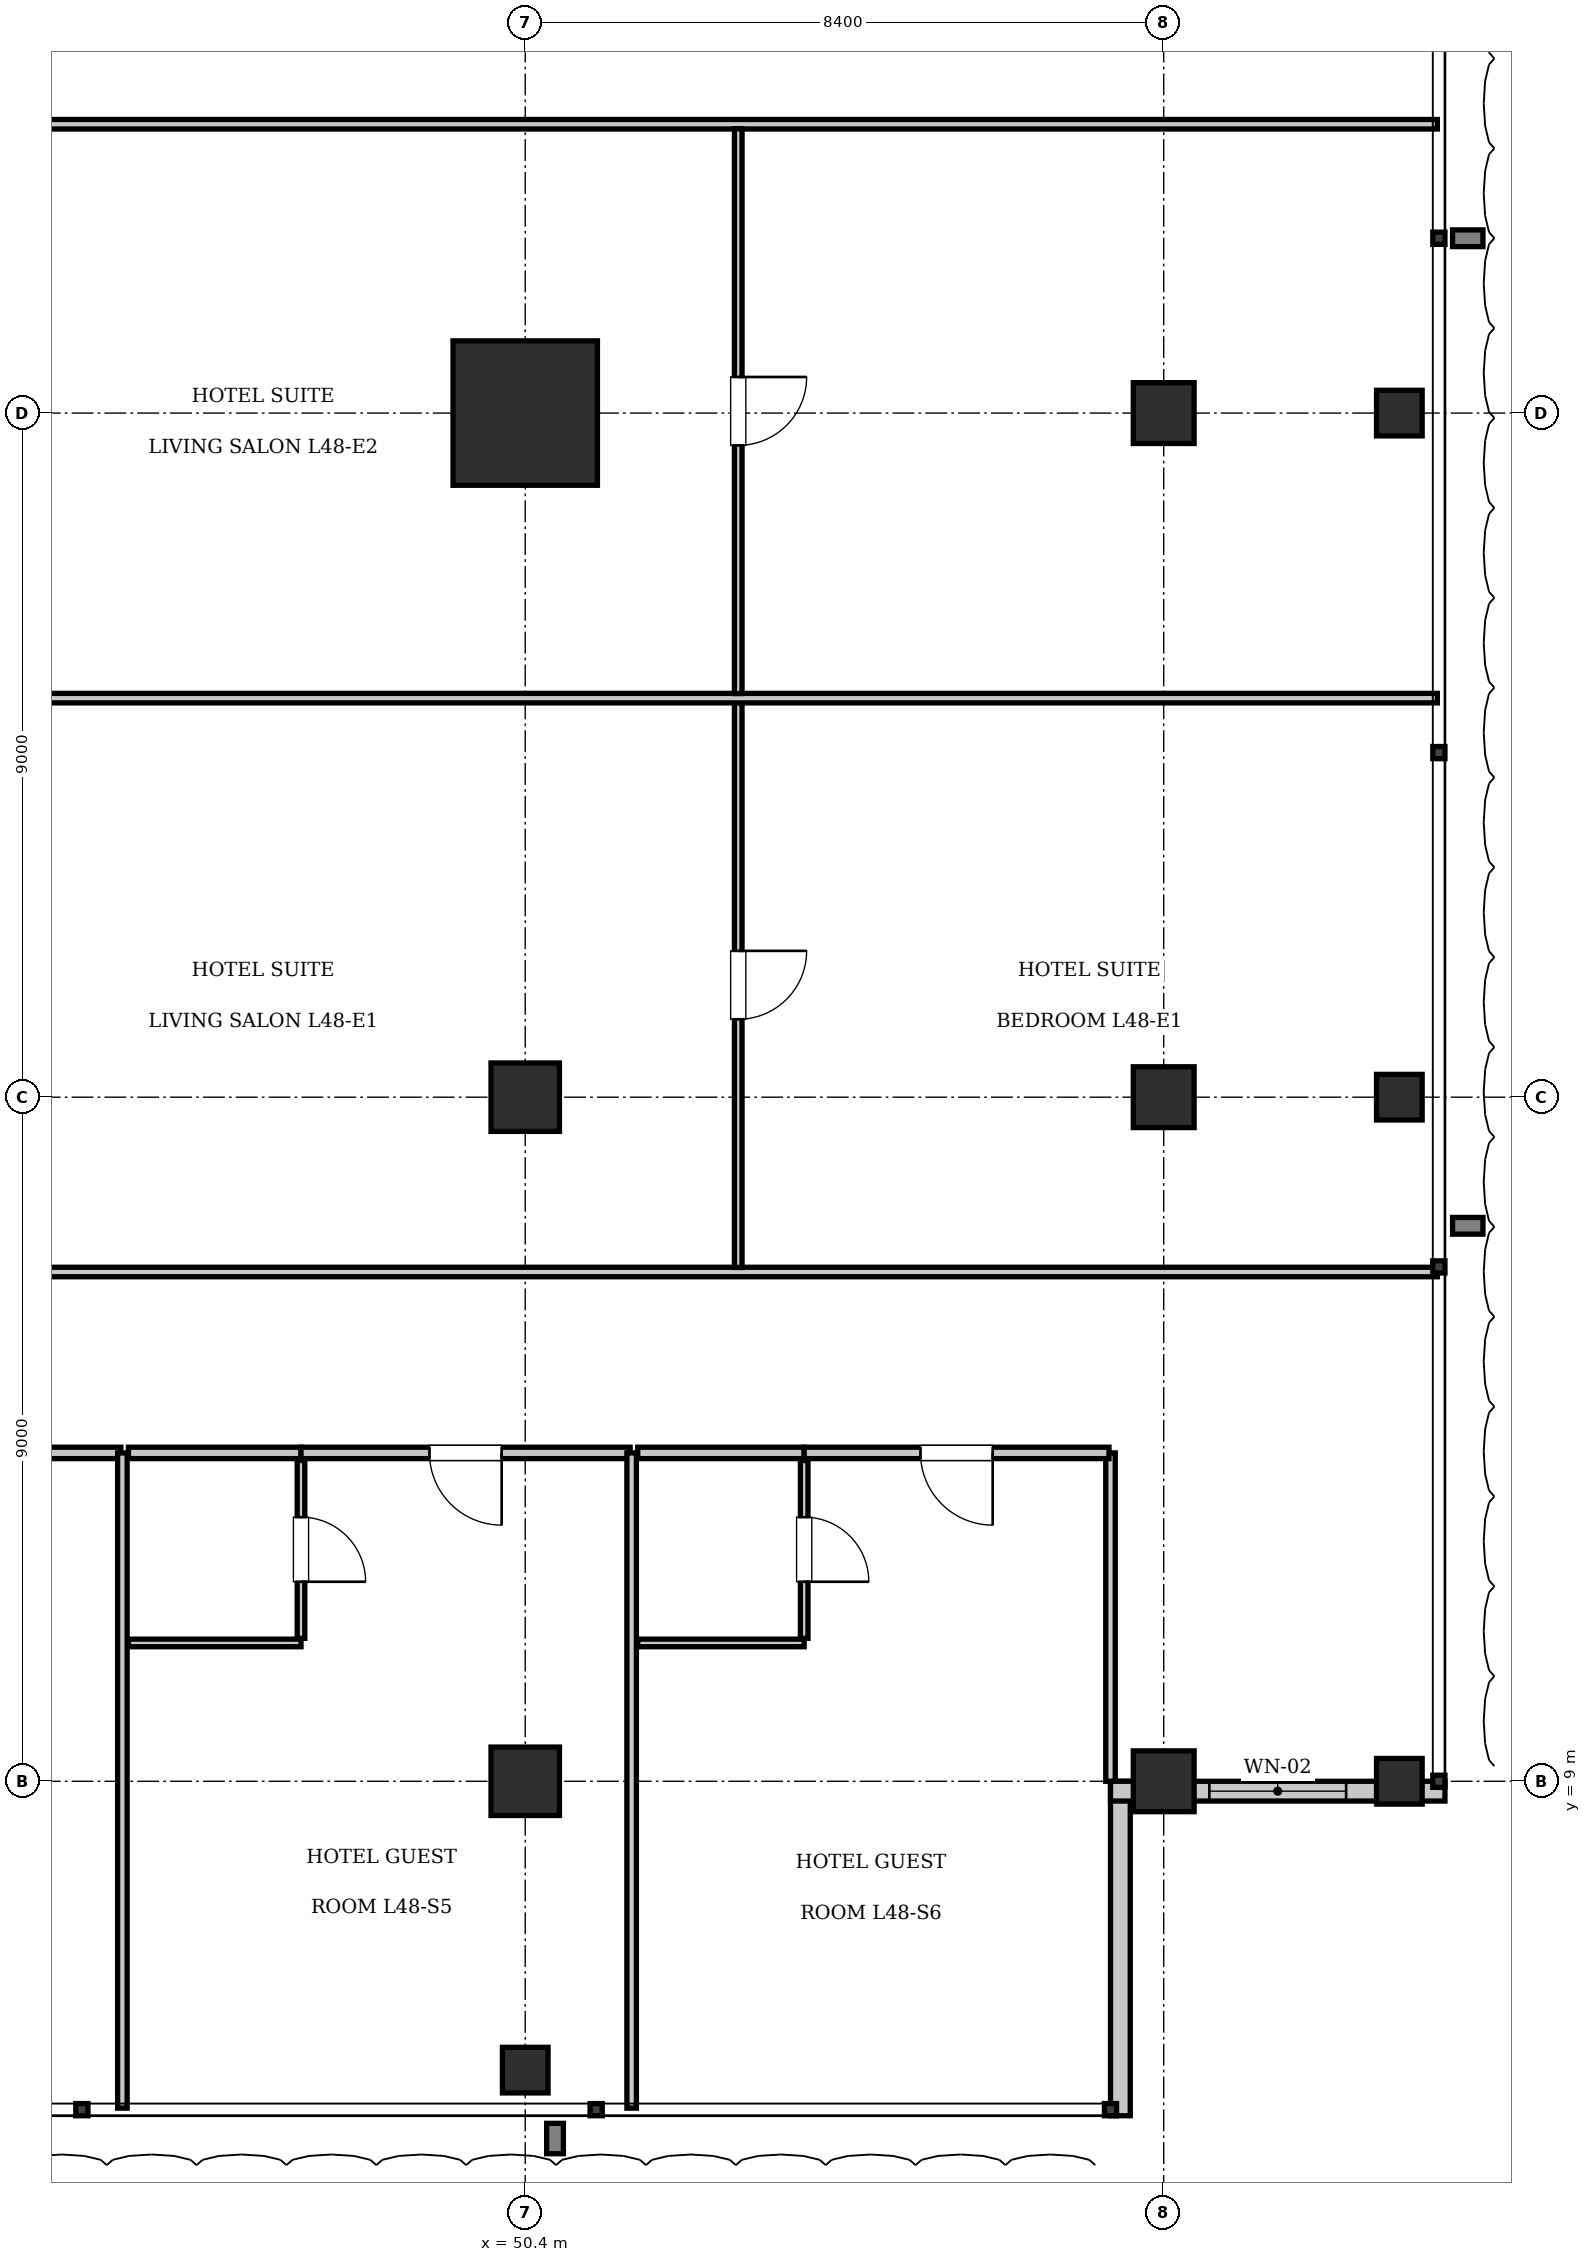
"""IFC4 building model, lengths in metres.
Left out: names, types, materials, properties, quantities, classifications, styles, units other than length and angle.
Written with IfcOpenShell. Run it as: python <this file> out.ifc"""

import sys

from ifc_helpers import new_model, si_unit, direction, frame, frame_2d, origin, origin_2d, place, context, subcontext, project, spatial, rectangle, i_section, extrude, element, fill, save


model = new_model("IFC4")
c1 = context("Model", 3, precision=1e-05, world=origin(), true_north=direction((0.0, 1.0)))
c2 = subcontext(c1, "Body", "Model", "MODEL_VIEW")
j1 = project(units=[si_unit("LENGTHUNIT", "METRE"), si_unit("PLANEANGLEUNIT", "RADIAN")], contexts=[c1])
p1 = place(None, origin())
s1 = spatial("IfcSite", under=j1, at=p1, CompositionType="ELEMENT")
p2 = place(p1, origin())
s2 = spatial("IfcBuilding", under=s1, at=p2, CompositionType="ELEMENT")
p3 = place(p2, frame((0.0, 0.0, 196.7)))
s3 = spatial("IfcBuildingStorey", under=s2, at=p3, CompositionType="ELEMENT", Elevation=196.7)
p4 = place(p3, frame((50.4, 27.0, 0.0), z_axis=(0.0, 0.0, 1.0), x_axis=(1.0, 0.0, 0.0)))
e1 = element("IfcColumn", 1, at=p4, inside=s3, PredefinedType="COLUMN", context=c2, shape_type="SweptSolid", body=[
    extrude(rectangle(XDim=1.9, YDim=1.9, at=origin_2d()), origin(), (0.0, 0.0, 1.0), 3.85),
])
for number, where, z_axis, x_axis in (
    (2, (50.4, 18.0, 0.0), (0.0, 0.0, 1.0), (1.0, 0.0, 0.0)),
    (3, (50.4, 9.0, 0.0), (0.0, 0.0, 1.0), (1.0, 0.0, 0.0)),
):
    element("IfcColumn", number, at=place(p3, frame(where, z_axis=z_axis, x_axis=x_axis)), inside=s3, PredefinedType="COLUMN", context=c2, shape_type="SweptSolid", body=[
        extrude(rectangle(XDim=0.9, YDim=0.9, at=origin_2d()), origin(), (0.0, 0.0, 1.0), 3.85),
    ])
for number, where, z_axis, x_axis in (
    (4, (58.8, 9.0, 0.0), (0.0, 0.0, 1.0), (1.0, 0.0, 0.0)),
    (5, (58.8, 18.0, 0.0), (0.0, 0.0, 1.0), (1.0, 0.0, 0.0)),
    (6, (58.8, 27.0, 0.0), (0.0, 0.0, 1.0), (1.0, 0.0, 0.0)),
):
    element("IfcColumn", number, at=place(p3, frame(where, z_axis=z_axis, x_axis=x_axis)), inside=s3, PredefinedType="COLUMN", context=c2, shape_type="SweptSolid", body=[
        extrude(rectangle(XDim=0.8, YDim=0.8, at=origin_2d()), origin(), (0.0, 0.0, 1.0), 3.85),
    ])
for number, where, z_axis, x_axis in (
    (7, (61.9, 9.0, 0.0), (0.0, 0.0, 1.0), (1.0, 0.0, 0.0)),
    (8, (61.9, 18.0, 0.0), (0.0, 0.0, 1.0), (1.0, 0.0, 0.0)),
    (9, (61.9, 27.0, 0.0), (0.0, 0.0, 1.0), (1.0, 0.0, 0.0)),
    (10, (50.4, 5.2, 0.0), (0.0, 0.0, 1.0), (1.0, 0.0, 0.0)),
):
    element("IfcColumn", number, at=place(p3, frame(where, z_axis=z_axis, x_axis=x_axis)), inside=s3, PredefinedType="COLUMN", context=c2, shape_type="SweptSolid", body=[
        extrude(i_section(OverallWidth=0.6, OverallDepth=0.6, WebThickness=0.025, FlangeThickness=0.038, at=origin_2d()), origin(), (0.0, 0.0, 1.0), 3.85),
    ])
p5 = place(p3, frame((58.23, 9.0, 0.0), z_axis=(0.0, 0.0, 1.0), x_axis=(0.0, -1.0, 0.0)))
e11 = element("IfcWall", 11, at=p5, inside=s3, PredefinedType="SOLIDWALL", context=c2, shape_type="SweptSolid", body=[
    extrude(rectangle(XDim=4.4, YDim=0.26, at=frame_2d((2.2, 0.0))), origin(), (0.0, 0.0, 1.0), 3.61),
])
p6 = place(p3, frame((62.5, 8.87, 0.0), z_axis=(0.0, 0.0, 1.0), x_axis=(-1.0, 0.0, 0.0)))
e12 = element("IfcWall", 12, at=p6, inside=s3, PredefinedType="SOLIDWALL", context=c2, shape_type="SweptSolid", body=[
    extrude(rectangle(XDim=4.4, YDim=0.26, at=frame_2d((2.2, 0.0))), origin(), (0.0, 0.0, 1.0), 3.071),
])
p7 = place(p6, frame((1.3, 0.0, 0.9)))
e13 = element("IfcOpeningElement", 13, at=p7, cuts=e12, PredefinedType="OPENING", context=c2, shape_type="SweptSolid", body=[
    extrude(rectangle(XDim=1.8, YDim=2.1, at=frame_2d((0.9, 1.05))), frame((0.0, 0.14, 0.0), z_axis=(0.0, -1.0, 0.0), x_axis=(1.0, 0.0, 0.0)), (0.0, 0.0, 1.0), 0.28),
])
p8 = place(p3, frame((58.1, 9.0, 0.0), z_axis=(0.0, 0.0, 1.0), x_axis=(0.0, 1.0, 0.0)))
e14 = element("IfcWall", 14, at=p8, inside=s3, PredefinedType="PARTITIONING", context=c2, shape_type="SweptSolid", body=[
    extrude(rectangle(XDim=4.32, YDim=0.125, at=frame_2d((2.16, 0.0))), origin(), (0.0, 0.0, 1.0), 3.61),
])
p9 = place(p3, frame((40.15, 13.32, 0.0), z_axis=(0.0, 0.0, 1.0), x_axis=(1.0, 0.0, 0.0)))
e15 = element("IfcWall", 15, at=p9, inside=s3, PredefinedType="PARTITIONING", context=c2, shape_type="SweptSolid", body=[
    extrude(rectangle(XDim=4.93, YDim=0.15, at=frame_2d((2.465, 0.0))), origin(), (0.0, 0.0, 1.0), 3.61),
])
p10 = place(p9, frame((1.99, 0.0, 0.0)))
e16 = element("IfcOpeningElement", 16, at=p10, cuts=e15, PredefinedType="OPENING", context=c2, shape_type="SweptSolid", body=[
    extrude(rectangle(XDim=0.95, YDim=2.15, at=frame_2d((0.475, 1.075))), frame((0.0, 0.085, 0.0), z_axis=(0.0, -1.0, 0.0), x_axis=(1.0, 0.0, 0.0)), (0.0, 0.0, 1.0), 0.17),
])
p11 = place(p3, frame((45.1, 4.7, 0.0), z_axis=(0.0, 0.0, 1.0), x_axis=(0.0, 1.0, 0.0)))
e17 = element("IfcWall", 17, at=p11, inside=s3, PredefinedType="PARTITIONING", context=c2, shape_type="SweptSolid", body=[
    extrude(rectangle(XDim=8.62, YDim=0.125, at=frame_2d((4.31, 0.0))), origin(), (0.0, 0.0, 1.0), 3.61),
])
p12 = place(p3, frame((45.18, 13.32, 0.0), z_axis=(0.0, 0.0, 1.0), x_axis=(1.0, 0.0, 0.0)))
e18 = element("IfcWall", 18, at=p12, inside=s3, PredefinedType="PARTITIONING", context=c2, shape_type="SweptSolid", body=[
    extrude(rectangle(XDim=2.27, YDim=0.15, at=frame_2d((1.135, 0.0))), origin(), (0.0, 0.0, 1.0), 3.61),
])
p13 = place(p3, frame((45.18, 10.82, 0.0), z_axis=(0.0, 0.0, 1.0), x_axis=(1.0, 0.0, 0.0)))
e19 = element("IfcWall", 19, at=p13, inside=s3, PredefinedType="PARTITIONING", context=c2, shape_type="SweptSolid", body=[
    extrude(rectangle(XDim=2.27, YDim=0.1, at=frame_2d((1.135, 0.0))), origin(), (0.0, 0.0, 1.0), 3.61),
])
p14 = place(p3, frame((47.45, 10.88, 0.0), z_axis=(0.0, 0.0, 1.0), x_axis=(0.0, 1.0, 0.0)))
e20 = element("IfcWall", 20, at=p14, inside=s3, PredefinedType="PARTITIONING", context=c2, shape_type="SweptSolid", body=[
    extrude(rectangle(XDim=2.34, YDim=0.1, at=frame_2d((1.17, 0.0))), origin(), (0.0, 0.0, 1.0), 3.61),
])
p15 = place(p14, frame((0.745, 0.0, 0.0)))
e21 = element("IfcOpeningElement", 21, at=p15, cuts=e20, PredefinedType="OPENING", context=c2, shape_type="SweptSolid", body=[
    extrude(rectangle(XDim=0.85, YDim=2.1, at=frame_2d((0.425, 1.05))), frame((0.0, 0.06, 0.0), z_axis=(0.0, -1.0, 0.0), x_axis=(1.0, 0.0, 0.0)), (0.0, 0.0, 1.0), 0.12),
])
p16 = place(p3, frame((47.45, 13.32, 0.0), z_axis=(0.0, 0.0, 1.0), x_axis=(1.0, 0.0, 0.0)))
e22 = element("IfcWall", 22, at=p16, inside=s3, PredefinedType="PARTITIONING", context=c2, shape_type="SweptSolid", body=[
    extrude(rectangle(XDim=4.33, YDim=0.15, at=frame_2d((2.165, 0.0))), origin(), (0.0, 0.0, 1.0), 3.61),
])
p17 = place(p16, frame((1.69, 0.0, 0.0)))
e23 = element("IfcOpeningElement", 23, at=p17, cuts=e22, PredefinedType="OPENING", context=c2, shape_type="SweptSolid", body=[
    extrude(rectangle(XDim=0.95, YDim=2.15, at=frame_2d((0.475, 1.075))), frame((0.0, 0.085, 0.0), z_axis=(0.0, -1.0, 0.0), x_axis=(1.0, 0.0, 0.0)), (0.0, 0.0, 1.0), 0.17),
])
p18 = place(p3, frame((51.8, 4.7, 0.0), z_axis=(0.0, 0.0, 1.0), x_axis=(0.0, 1.0, 0.0)))
e24 = element("IfcWall", 24, at=p18, inside=s3, PredefinedType="PARTITIONING", context=c2, shape_type="SweptSolid", body=[
    extrude(rectangle(XDim=8.62, YDim=0.125, at=frame_2d((4.31, 0.0))), origin(), (0.0, 0.0, 1.0), 3.61),
])
p19 = place(p3, frame((51.88, 13.32, 0.0), z_axis=(0.0, 0.0, 1.0), x_axis=(1.0, 0.0, 0.0)))
e25 = element("IfcWall", 25, at=p19, inside=s3, PredefinedType="PARTITIONING", context=c2, shape_type="SweptSolid", body=[
    extrude(rectangle(XDim=2.19, YDim=0.15, at=frame_2d((1.095, 0.0))), origin(), (0.0, 0.0, 1.0), 3.61),
])
p20 = place(p3, frame((51.88, 10.82, 0.0), z_axis=(0.0, 0.0, 1.0), x_axis=(1.0, 0.0, 0.0)))
e26 = element("IfcWall", 26, at=p20, inside=s3, PredefinedType="PARTITIONING", context=c2, shape_type="SweptSolid", body=[
    extrude(rectangle(XDim=2.19, YDim=0.1, at=frame_2d((1.095, 0.0))), origin(), (0.0, 0.0, 1.0), 3.61),
])
p21 = place(p3, frame((54.07, 10.88, 0.0), z_axis=(0.0, 0.0, 1.0), x_axis=(0.0, 1.0, 0.0)))
e27 = element("IfcWall", 27, at=p21, inside=s3, PredefinedType="PARTITIONING", context=c2, shape_type="SweptSolid", body=[
    extrude(rectangle(XDim=2.34, YDim=0.1, at=frame_2d((1.17, 0.0))), origin(), (0.0, 0.0, 1.0), 3.61),
])
p22 = place(p21, frame((0.745, 0.0, 0.0)))
e28 = element("IfcOpeningElement", 28, at=p22, cuts=e27, PredefinedType="OPENING", context=c2, shape_type="SweptSolid", body=[
    extrude(rectangle(XDim=0.85, YDim=2.1, at=frame_2d((0.425, 1.05))), frame((0.0, 0.06, 0.0), z_axis=(0.0, -1.0, 0.0), x_axis=(1.0, 0.0, 0.0)), (0.0, 0.0, 1.0), 0.12),
])
p23 = place(p3, frame((54.07, 13.32, 0.0), z_axis=(0.0, 0.0, 1.0), x_axis=(1.0, 0.0, 0.0)))
e29 = element("IfcWall", 29, at=p23, inside=s3, PredefinedType="PARTITIONING", context=c2, shape_type="SweptSolid", body=[
    extrude(rectangle(XDim=4.01, YDim=0.15, at=frame_2d((2.005, 0.0))), origin(), (0.0, 0.0, 1.0), 3.61),
])
p24 = place(p23, frame((1.53, 0.0, 0.0)))
e30 = element("IfcOpeningElement", 30, at=p24, cuts=e29, PredefinedType="OPENING", context=c2, shape_type="SweptSolid", body=[
    extrude(rectangle(XDim=0.95, YDim=2.15, at=frame_2d((0.475, 1.075))), frame((0.0, 0.085, 0.0), z_axis=(0.0, -1.0, 0.0), x_axis=(1.0, 0.0, 0.0)), (0.0, 0.0, 1.0), 0.17),
])
for number, where, z_axis, x_axis in (
    (31, (40.68, 15.7, 0.0), (0.0, 0.0, 1.0), (1.0, 0.0, 0.0)),
    (32, (40.68, 30.8, 0.0), (0.0, 0.0, 1.0), (1.0, 0.0, 0.0)),
):
    element("IfcWall", number, at=place(p3, frame(where, z_axis=z_axis, x_axis=x_axis)), inside=s3, PredefinedType="PARTITIONING", context=c2, shape_type="SweptSolid", body=[
        extrude(rectangle(XDim=21.72, YDim=0.125, at=frame_2d((10.86, 0.0))), origin(), (0.0, 0.0, 1.0), 3.61),
    ])
p25 = place(p3, frame((53.202, 15.76, 0.0), z_axis=(0.0, 0.0, 1.0), x_axis=(0.0, 1.0, 0.0)))
e33 = element("IfcWall", 33, at=p25, inside=s3, PredefinedType="PARTITIONING", context=c2, shape_type="SweptSolid", body=[
    extrude(rectangle(XDim=7.43, YDim=0.1, at=frame_2d((3.715, 0.0))), origin(), (0.0, 0.0, 1.0), 3.61),
])
p26 = place(p25, frame((3.265, 0.0, 0.0)))
e34 = element("IfcOpeningElement", 34, at=p26, cuts=e33, PredefinedType="OPENING", context=c2, shape_type="SweptSolid", body=[
    extrude(rectangle(XDim=0.9, YDim=2.1, at=frame_2d((0.45, 1.05))), frame((0.0, 0.06, 0.0), z_axis=(0.0, -1.0, 0.0), x_axis=(1.0, 0.0, 0.0)), (0.0, 0.0, 1.0), 0.12),
])
p27 = place(p3, frame((40.68, 23.25, 0.0), z_axis=(0.0, 0.0, 1.0), x_axis=(1.0, 0.0, 0.0)))
e35 = element("IfcWall", 35, at=p27, inside=s3, PredefinedType="PARTITIONING", context=c2, shape_type="SweptSolid", body=[
    extrude(rectangle(XDim=21.72, YDim=0.125, at=frame_2d((10.86, 0.0))), origin(), (0.0, 0.0, 1.0), 3.61),
])
p28 = place(p3, frame((53.202, 23.31, 0.0), z_axis=(0.0, 0.0, 1.0), x_axis=(0.0, 1.0, 0.0)))
e36 = element("IfcWall", 36, at=p28, inside=s3, PredefinedType="PARTITIONING", context=c2, shape_type="SweptSolid", body=[
    extrude(rectangle(XDim=7.43, YDim=0.1, at=frame_2d((3.715, 0.0))), origin(), (0.0, 0.0, 1.0), 3.61),
])
p29 = place(p28, frame((3.265, 0.0, 0.0)))
e37 = element("IfcOpeningElement", 37, at=p29, cuts=e36, PredefinedType="OPENING", context=c2, shape_type="SweptSolid", body=[
    extrude(rectangle(XDim=0.9, YDim=2.1, at=frame_2d((0.45, 1.05))), frame((0.0, 0.06, 0.0), z_axis=(0.0, -1.0, 0.0), x_axis=(1.0, 0.0, 0.0)), (0.0, 0.0, 1.0), 0.12),
])
p30 = place(p7, origin())
e38 = element("IfcWindow", 38, at=p30, inside=s3, PartitioningType="SINGLE_PANEL", PredefinedType="WINDOW", context=c2, shape_type="SweptSolid", body=[
    extrude(rectangle(XDim=1.8, YDim=2.1, at=frame_2d((0.9, 1.05))), frame((0.0, 0.03, 0.0), z_axis=(0.0, -1.0, 0.0), x_axis=(1.0, 0.0, 0.0)), (0.0, 0.0, 1.0), 0.06),
])
fill(e13, e38)
p31 = place(p15, frame((0.85, 0.0, 0.0), z_axis=(0.0, 0.0, 1.0), x_axis=(-1.0, 0.0, 0.0)))
e39 = element("IfcDoor", 39, at=p31, inside=s3, OperationType="SINGLE_SWING_RIGHT", PredefinedType="DOOR", context=c2, shape_type="SweptSolid", body=[
    extrude(rectangle(XDim=0.85, YDim=2.1, at=frame_2d((0.425, 1.05))), frame((0.0, 0.025, 0.0), z_axis=(0.0, -1.0, 0.0), x_axis=(1.0, 0.0, 0.0)), (0.0, 0.0, 1.0), 0.05),
])
fill(e21, e39)
p32 = place(p17, frame((0.95, 0.0, 0.0), z_axis=(0.0, 0.0, 1.0), x_axis=(-1.0, 0.0, 0.0)))
e40 = element("IfcDoor", 40, at=p32, inside=s3, OperationType="SINGLE_SWING_LEFT", PredefinedType="DOOR", context=c2, shape_type="SweptSolid", body=[
    extrude(rectangle(XDim=0.95, YDim=2.15, at=frame_2d((0.475, 1.075))), frame((0.0, 0.025, 0.0), z_axis=(0.0, -1.0, 0.0), x_axis=(1.0, 0.0, 0.0)), (0.0, 0.0, 1.0), 0.05),
])
fill(e23, e40)
p33 = place(p22, frame((0.85, 0.0, 0.0), z_axis=(0.0, 0.0, 1.0), x_axis=(-1.0, 0.0, 0.0)))
e41 = element("IfcDoor", 41, at=p33, inside=s3, OperationType="SINGLE_SWING_RIGHT", PredefinedType="DOOR", context=c2, shape_type="SweptSolid", body=[
    extrude(rectangle(XDim=0.85, YDim=2.1, at=frame_2d((0.425, 1.05))), frame((0.0, 0.025, 0.0), z_axis=(0.0, -1.0, 0.0), x_axis=(1.0, 0.0, 0.0)), (0.0, 0.0, 1.0), 0.05),
])
fill(e28, e41)
p34 = place(p24, frame((0.95, 0.0, 0.0), z_axis=(0.0, 0.0, 1.0), x_axis=(-1.0, 0.0, 0.0)))
e42 = element("IfcDoor", 42, at=p34, inside=s3, OperationType="SINGLE_SWING_LEFT", PredefinedType="DOOR", context=c2, shape_type="SweptSolid", body=[
    extrude(rectangle(XDim=0.95, YDim=2.15, at=frame_2d((0.475, 1.075))), frame((0.0, 0.025, 0.0), z_axis=(0.0, -1.0, 0.0), x_axis=(1.0, 0.0, 0.0)), (0.0, 0.0, 1.0), 0.05),
])
fill(e30, e42)
p35 = place(p26, frame((0.9, 0.0, 0.0), z_axis=(0.0, 0.0, 1.0), x_axis=(-1.0, 0.0, 0.0)))
e43 = element("IfcDoor", 43, at=p35, inside=s3, OperationType="SINGLE_SWING_LEFT", PredefinedType="DOOR", context=c2, shape_type="SweptSolid", body=[
    extrude(rectangle(XDim=0.9, YDim=2.1, at=frame_2d((0.45, 1.05))), frame((0.0, 0.025, 0.0), z_axis=(0.0, -1.0, 0.0), x_axis=(1.0, 0.0, 0.0)), (0.0, 0.0, 1.0), 0.05),
])
fill(e34, e43)
p36 = place(p29, frame((0.9, 0.0, 0.0), z_axis=(0.0, 0.0, 1.0), x_axis=(-1.0, 0.0, 0.0)))
e44 = element("IfcDoor", 44, at=p36, inside=s3, OperationType="SINGLE_SWING_LEFT", PredefinedType="DOOR", context=c2, shape_type="SweptSolid", body=[
    extrude(rectangle(XDim=0.9, YDim=2.1, at=frame_2d((0.45, 1.05))), frame((0.0, 0.025, 0.0), z_axis=(0.0, -1.0, 0.0), x_axis=(1.0, 0.0, 0.0)), (0.0, 0.0, 1.0), 0.05),
])
fill(e37, e44)
save(model, sys.argv[1])
